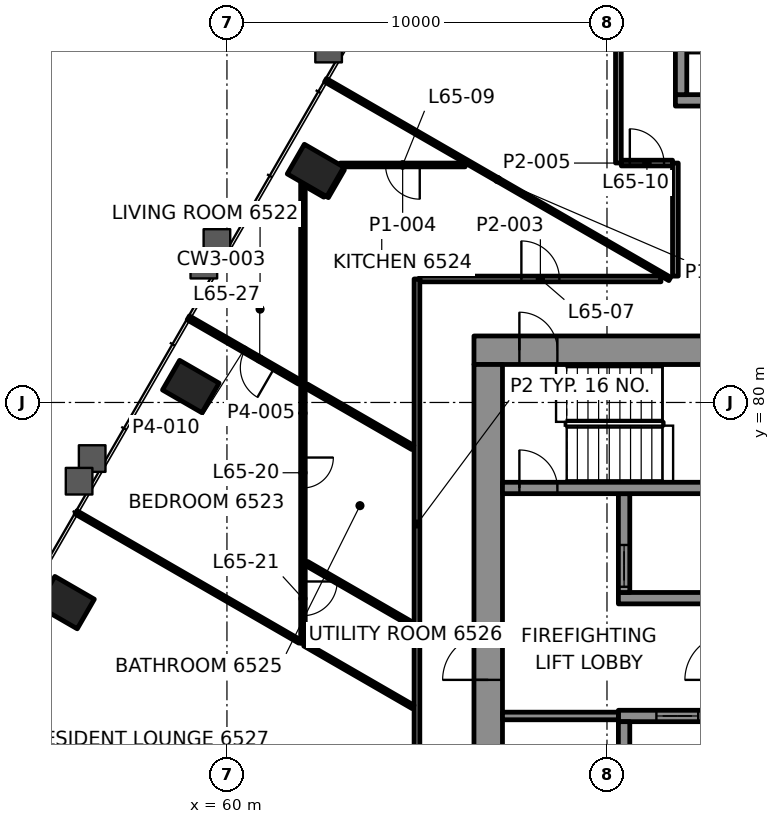
"""IFC4 building model, lengths in metres.
Left out: names, types, materials, properties, quantities, classifications, styles, units other than length and angle.
Written with IfcOpenShell. Run it as: python <this file> out.ifc"""

import sys

from ifc_helpers import new_model, si_unit, direction, frame, frame_2d, origin, origin_2d, place, context, subcontext, project, spatial, rectangle, hollow_rectangle, extrude, element, fill, save


model = new_model("IFC4")
c1 = context("Model", 3, precision=1e-05, world=origin(), true_north=direction((0.0, 1.0)))
c2 = subcontext(c1, "Body", "Model", "MODEL_VIEW")
j1 = project(units=[si_unit("LENGTHUNIT", "METRE"), si_unit("PLANEANGLEUNIT", "RADIAN")], contexts=[c1])
p1 = place(None, origin())
s1 = spatial("IfcSite", under=j1, at=p1, CompositionType="ELEMENT")
p2 = place(p1, origin())
s2 = spatial("IfcBuilding", under=s1, at=p2, CompositionType="ELEMENT")
p3 = place(p2, frame((0.0, 0.0, 274.1)))
s3 = spatial("IfcBuildingStorey", under=s2, at=p3, CompositionType="ELEMENT", Elevation=274.1)
for number, where, z_axis, x_axis in (
    (1, (62.332, 86.105, -0.0), (0.0, 0.0, 1.0), (-0.5, -0.866, 0.0)),
    (2, (59.049, 80.419, -0.0), (0.0, 0.0, 1.0), (-0.5, -0.866, 0.0)),
    (3, (55.766, 74.733, -0.0), (0.0, 0.0, 1.0), (-0.5, -0.866, 0.0)),
):
    element("IfcColumn", number, at=place(p3, frame(where, z_axis=z_axis, x_axis=x_axis)), inside=s3, PredefinedType="COLUMN", context=c2, shape_type="SweptSolid", body=[
        extrude(hollow_rectangle(XDim=0.9, YDim=1.2, WallThickness=0.06, at=origin_2d()), origin(), (0.0, 0.0, 1.0), 3.5),
    ])
p4 = place(p3, frame((66.5, 81.375, 0.0), z_axis=(0.0, 0.0, 1.0), x_axis=(1.0, 0.0, 0.0)))
e4 = element("IfcWall", 4, at=p4, inside=s3, PredefinedType="SHEAR", context=c2, shape_type="SweptSolid", body=[
    extrude(rectangle(XDim=17.0, YDim=0.75, at=frame_2d((8.5, 0.0))), origin(), (0.0, 0.0, 1.0), 3.3),
])
p5 = place(p4, frame((1.195, 0.0, 0.0)))
e5 = element("IfcOpeningElement", 5, at=p5, cuts=e4, PredefinedType="OPENING", context=c2, shape_type="SweptSolid", body=[
    extrude(rectangle(XDim=1.0, YDim=2.1, at=frame_2d((0.5, 1.05))), frame((0.0, 0.385, 0.0), z_axis=(0.0, -1.0, 0.0), x_axis=(1.0, 0.0, 0.0)), (0.0, 0.0, 1.0), 0.77),
])
p6 = place(p4, frame((15.005, 0.0, 0.0)))
e6 = element("IfcOpeningElement", 6, at=p6, cuts=e4, PredefinedType="OPENING", context=c2, shape_type="SweptSolid", body=[
    extrude(rectangle(XDim=1.0, YDim=2.1, at=frame_2d((0.5, 1.05))), frame((0.0, 0.385, 0.0), z_axis=(0.0, -1.0, 0.0), x_axis=(1.0, 0.0, 0.0)), (0.0, 0.0, 1.0), 0.77),
])
p7 = place(p4, frame((8.15, 0.0, 0.0)))
e7 = element("IfcOpeningElement", 7, at=p7, cuts=e4, PredefinedType="OPENING", context=c2, shape_type="SweptSolid", body=[
    extrude(rectangle(XDim=0.9, YDim=2.1, at=frame_2d((0.45, 1.05))), frame((0.0, 0.385, 0.0), z_axis=(0.0, -1.0, 0.0), x_axis=(1.0, 0.0, 0.0)), (0.0, 0.0, 1.0), 0.77),
])
p8 = place(p3, frame((66.875, 69.0, 0.0), z_axis=(0.0, 0.0, 1.0), x_axis=(0.0, 1.0, 0.0)))
e8 = element("IfcWall", 8, at=p8, inside=s3, PredefinedType="SHEAR", context=c2, shape_type="SweptSolid", body=[
    extrude(rectangle(XDim=12.0, YDim=0.75, at=frame_2d((6.0, 0.0))), origin(), (0.0, 0.0, 1.0), 3.3),
])
p9 = place(p8, frame((3.7, 0.0, 0.0)))
e9 = element("IfcOpeningElement", 9, at=p9, cuts=e8, PredefinedType="OPENING", context=c2, shape_type="SweptSolid", body=[
    extrude(rectangle(XDim=1.2, YDim=2.1, at=frame_2d((0.6, 1.05))), frame((0.0, 0.385, 0.0), z_axis=(0.0, -1.0, 0.0), x_axis=(1.0, 0.0, 0.0)), (0.0, 0.0, 1.0), 0.77),
])
p10 = place(p3, frame((70.3, 71.75, 0.0), z_axis=(0.0, 0.0, 1.0), x_axis=(1.0, 0.0, 0.0)))
e10 = element("IfcWall", 10, at=p10, inside=s3, PredefinedType="SHEAR", context=c2, shape_type="SweptSolid", body=[
    extrude(rectangle(XDim=11.5, YDim=0.3, at=frame_2d((5.75, 0.0))), origin(), (0.0, 0.0, 1.0), 3.3),
])
p11 = place(p10, frame((1.0, 0.0, 0.0)))
e11 = element("IfcOpeningElement", 11, at=p11, cuts=e10, PredefinedType="OPENING", context=c2, shape_type="SweptSolid", body=[
    extrude(rectangle(XDim=1.1, YDim=2.1, at=frame_2d((0.55, 1.05))), frame((0.0, 0.16, 0.0), z_axis=(0.0, -1.0, 0.0), x_axis=(1.0, 0.0, 0.0)), (0.0, 0.0, 1.0), 0.32),
])
p12 = place(p10, frame((3.8, 0.0, 0.0)))
e12 = element("IfcOpeningElement", 12, at=p12, cuts=e10, PredefinedType="OPENING", context=c2, shape_type="SweptSolid", body=[
    extrude(rectangle(XDim=1.1, YDim=2.1, at=frame_2d((0.55, 1.05))), frame((0.0, 0.16, 0.0), z_axis=(0.0, -1.0, 0.0), x_axis=(1.0, 0.0, 0.0)), (0.0, 0.0, 1.0), 0.32),
])
p13 = place(p10, frame((6.6, 0.0, 0.0)))
e13 = element("IfcOpeningElement", 13, at=p13, cuts=e10, PredefinedType="OPENING", context=c2, shape_type="SweptSolid", body=[
    extrude(rectangle(XDim=1.1, YDim=2.1, at=frame_2d((0.55, 1.05))), frame((0.0, 0.16, 0.0), z_axis=(0.0, -1.0, 0.0), x_axis=(1.0, 0.0, 0.0)), (0.0, 0.0, 1.0), 0.32),
])
p14 = place(p10, frame((9.4, 0.0, 0.0)))
e14 = element("IfcOpeningElement", 14, at=p14, cuts=e10, PredefinedType="OPENING", context=c2, shape_type="SweptSolid", body=[
    extrude(rectangle(XDim=1.1, YDim=2.1, at=frame_2d((0.55, 1.05))), frame((0.0, 0.16, 0.0), z_axis=(0.0, -1.0, 0.0), x_axis=(1.0, 0.0, 0.0)), (0.0, 0.0, 1.0), 0.32),
])
p15 = place(p3, frame((70.3, 74.85, 0.0), z_axis=(0.0, 0.0, 1.0), x_axis=(1.0, 0.0, 0.0)))
e15 = element("IfcWall", 15, at=p15, inside=s3, PredefinedType="SHEAR", context=c2, shape_type="SweptSolid", body=[
    extrude(rectangle(XDim=5.9, YDim=0.3, at=frame_2d((2.95, 0.0))), origin(), (0.0, 0.0, 1.0), 3.3),
])
p16 = place(p15, frame((3.8, 0.0, 0.0)))
e16 = element("IfcOpeningElement", 16, at=p16, cuts=e15, PredefinedType="OPENING", context=c2, shape_type="SweptSolid", body=[
    extrude(rectangle(XDim=1.1, YDim=2.1, at=frame_2d((0.55, 1.05))), frame((0.0, 0.16, 0.0), z_axis=(0.0, -1.0, 0.0), x_axis=(1.0, 0.0, 0.0)), (0.0, 0.0, 1.0), 0.32),
])
p17 = place(p3, frame((70.45, 69.0, 0.0), z_axis=(0.0, 0.0, 1.0), x_axis=(0.0, 1.0, 0.0)))
e17 = element("IfcWall", 17, at=p17, inside=s3, PredefinedType="SHEAR", context=c2, shape_type="SweptSolid", body=[
    extrude(rectangle(XDim=2.6, YDim=0.3, at=frame_2d((1.3, 0.0))), origin(), (0.0, 0.0, 1.0), 3.3),
])
p18 = place(p3, frame((70.45, 75.0, 0.0), z_axis=(0.0, 0.0, 1.0), x_axis=(0.0, 1.0, 0.0)))
e18 = element("IfcWall", 18, at=p18, inside=s3, PredefinedType="SHEAR", context=c2, shape_type="SweptSolid", body=[
    extrude(rectangle(XDim=2.6, YDim=0.3, at=frame_2d((1.3, 0.0))), origin(), (0.0, 0.0, 1.0), 3.3),
])
p19 = place(p18, frame((0.15, 0.0, 0.0)))
e19 = element("IfcOpeningElement", 19, at=p19, cuts=e18, PredefinedType="OPENING", context=c2, shape_type="SweptSolid", body=[
    extrude(rectangle(XDim=1.1, YDim=2.1, at=frame_2d((0.55, 1.05))), frame((0.0, 0.16, 0.0), z_axis=(0.0, -1.0, 0.0), x_axis=(1.0, 0.0, 0.0)), (0.0, 0.0, 1.0), 0.32),
])
p20 = place(p3, frame((67.25, 77.75, 0.0), z_axis=(0.0, 0.0, 1.0), x_axis=(1.0, 0.0, 0.0)))
e20 = element("IfcWall", 20, at=p20, inside=s3, PredefinedType="SHEAR", context=c2, shape_type="SweptSolid", body=[
    extrude(rectangle(XDim=15.5, YDim=0.3, at=frame_2d((7.75, 0.0))), origin(), (0.0, 0.0, 1.0), 3.3),
])
p21 = place(p20, frame((0.445, 0.0, 0.0)))
e21 = element("IfcOpeningElement", 21, at=p21, cuts=e20, PredefinedType="OPENING", context=c2, shape_type="SweptSolid", body=[
    extrude(rectangle(XDim=1.0, YDim=2.1, at=frame_2d((0.5, 1.05))), frame((0.0, 0.16, 0.0), z_axis=(0.0, -1.0, 0.0), x_axis=(1.0, 0.0, 0.0)), (0.0, 0.0, 1.0), 0.32),
])
p22 = place(p3, frame((71.8, 87.95, 0.0), z_axis=(0.0, 0.0, 1.0), x_axis=(1.0, 0.0, 0.0)))
e22 = element("IfcWall", 22, at=p22, inside=s3, PredefinedType="SHEAR", context=c2, shape_type="SweptSolid", body=[
    extrude(rectangle(XDim=6.4, YDim=0.3, at=frame_2d((3.2, 0.0))), origin(), (0.0, 0.0, 1.0), 3.3),
])
p23 = place(p22, frame((1.325, 0.0, 0.0)))
e23 = element("IfcOpeningElement", 23, at=p23, cuts=e22, PredefinedType="OPENING", context=c2, shape_type="SweptSolid", body=[
    extrude(rectangle(XDim=1.0, YDim=2.1, at=frame_2d((0.5, 1.05))), frame((0.0, 0.16, 0.0), z_axis=(0.0, -1.0, 0.0), x_axis=(1.0, 0.0, 0.0)), (0.0, 0.0, 1.0), 0.32),
])
p24 = place(p22, frame((4.125, 0.0, 0.0)))
e24 = element("IfcOpeningElement", 24, at=p24, cuts=e22, PredefinedType="OPENING", context=c2, shape_type="SweptSolid", body=[
    extrude(rectangle(XDim=1.2, YDim=2.1, at=frame_2d((0.6, 1.05))), frame((0.0, 0.16, 0.0), z_axis=(0.0, -1.0, 0.0), x_axis=(1.0, 0.0, 0.0)), (0.0, 0.0, 1.0), 0.32),
])
p25 = place(p3, frame((71.95, 88.1, 0.0), z_axis=(0.0, 0.0, 1.0), x_axis=(0.0, 1.0, 0.0)))
e25 = element("IfcWall", 25, at=p25, inside=s3, PredefinedType="SHEAR", context=c2, shape_type="SweptSolid", body=[
    extrude(rectangle(XDim=6.2, YDim=0.3, at=frame_2d((3.1, 0.0))), origin(), (0.0, 0.0, 1.0), 3.3),
])
p26 = place(p3, frame((65.075, 83.25, 0.0), z_axis=(0.0, 0.0, 1.0), x_axis=(1.0, 0.0, 0.0)))
e26 = element("IfcWall", 26, at=p26, inside=s3, PredefinedType="PARTITIONING", context=c2, shape_type="SweptSolid", body=[
    extrude(rectangle(XDim=6.345, YDim=0.15, at=frame_2d((3.172, 0.0))), origin(), (0.0, 0.0, 1.0), 2.7),
])
p27 = place(p26, frame((2.672, 0.0, 0.0)))
e27 = element("IfcOpeningElement", 27, at=p27, cuts=e26, PredefinedType="OPENING", context=c2, shape_type="SweptSolid", body=[
    extrude(rectangle(XDim=1.0, YDim=2.1, at=frame_2d((0.5, 1.05))), frame((0.0, 0.085, 0.0), z_axis=(0.0, -1.0, 0.0), x_axis=(1.0, 0.0, 0.0)), (0.0, 0.0, 1.0), 0.17),
])
p28 = place(p3, frame((66.267, 86.25, 0.0), z_axis=(0.0, 0.0, 1.0), x_axis=(-1.0, 0.0, 0.0)))
e28 = element("IfcWall", 28, at=p28, inside=s3, PredefinedType="PARTITIONING", context=c2, shape_type="SweptSolid", body=[
    extrude(rectangle(XDim=3.287, YDim=0.1, at=frame_2d((1.644, 0.0))), origin(), (0.0, 0.0, 1.0), 2.7),
])
p29 = place(p28, frame((1.193, 0.0, 0.0)))
e29 = element("IfcOpeningElement", 29, at=p29, cuts=e28, PredefinedType="OPENING", context=c2, shape_type="SweptSolid", body=[
    extrude(rectangle(XDim=0.9, YDim=2.1, at=frame_2d((0.45, 1.05))), frame((0.0, 0.06, 0.0), z_axis=(0.0, -1.0, 0.0), x_axis=(1.0, 0.0, 0.0)), (0.0, 0.0, 1.0), 0.12),
])
p30 = place(p3, frame((70.377, 86.3, 0.0), z_axis=(0.0, 0.0, 1.0), x_axis=(1.0, 0.0, 0.0)))
e30 = element("IfcWall", 30, at=p30, inside=s3, PredefinedType="PARTITIONING", context=c2, shape_type="SweptSolid", body=[
    extrude(rectangle(XDim=1.348, YDim=0.15, at=frame_2d((0.674, 0.0))), origin(), (0.0, 0.0, 1.0), 2.7),
])
p31 = place(p30, frame((0.224, 0.0, 0.0)))
e31 = element("IfcOpeningElement", 31, at=p31, cuts=e30, PredefinedType="OPENING", context=c2, shape_type="SweptSolid", body=[
    extrude(rectangle(XDim=0.9, YDim=2.1, at=frame_2d((0.45, 1.05))), frame((0.0, 0.085, 0.0), z_axis=(0.0, -1.0, 0.0), x_axis=(1.0, 0.0, 0.0)), (0.0, 0.0, 1.0), 0.17),
])
p32 = place(p3, frame((62.626, 85.415, 0.0), z_axis=(0.0, 0.0, 1.0), x_axis=(0.499973348067, 0.866040790738, 0.0)))
e32 = element("IfcWall", 32, at=p32, inside=s3, PredefinedType="PARTITIONING", context=c2, shape_type="SweptSolid", body=[
    extrude(rectangle(XDim=0.842, YDim=0.1, at=frame_2d((0.421, 0.0))), origin(), (0.0, 0.0, 1.0), 2.7),
])
p33 = place(p3, frame((71.8, 83.325, 0.0), z_axis=(0.0, 0.0, 1.0), x_axis=(0.0, 1.0, 0.0)))
e33 = element("IfcWall", 33, at=p33, inside=s3, PredefinedType="PARTITIONING", context=c2, shape_type="SweptSolid", body=[
    extrude(rectangle(XDim=2.975, YDim=0.15, at=frame_2d((1.488, 0.0))), origin(), (0.0, 0.0, 1.0), 2.697),
])
p34 = place(p3, frame((70.3, 86.302, 0.0), z_axis=(0.0, 0.0, 1.0), x_axis=(0.0, 1.0, 0.0)))
e34 = element("IfcWall", 34, at=p34, inside=s3, PredefinedType="PARTITIONING", context=c2, shape_type="SweptSolid", body=[
    extrude(rectangle(XDim=9.796, YDim=0.15, at=frame_2d((4.898, 0.0))), origin(), (0.0, 0.0, 1.0), 2.7),
])
p35 = place(p3, frame((65.0, 70.352, 0.0), z_axis=(0.0, 0.0, 1.0), x_axis=(0.0, 1.0, 0.0)))
e35 = element("IfcWall", 35, at=p35, inside=s3, PredefinedType="PARTITIONING", context=c2, shape_type="SweptSolid", body=[
    extrude(rectangle(XDim=12.898, YDim=0.15, at=frame_2d((6.449, 0.0))), origin(), (0.0, 0.0, 1.0), 2.7),
])
p36 = place(p3, frame((62.0, 85.776, 0.0), z_axis=(0.0, 0.0, 1.0), x_axis=(0.0, -1.0, 0.0)))
e36 = element("IfcWall", 36, at=p36, inside=s3, PredefinedType="PARTITIONING", context=c2, shape_type="SweptSolid", body=[
    extrude(rectangle(XDim=12.115, YDim=0.12, at=frame_2d((6.058, 0.0))), origin(), (0.0, 0.0, 1.0), 2.688),
])
p37 = place(p36, frame((7.226, 0.0, 0.0)))
e37 = element("IfcOpeningElement", 37, at=p37, cuts=e36, PredefinedType="OPENING", context=c2, shape_type="SweptSolid", body=[
    extrude(rectangle(XDim=0.8, YDim=2.1, at=frame_2d((0.4, 1.05))), frame((0.0, 0.07, 0.0), z_axis=(0.0, -1.0, 0.0), x_axis=(1.0, 0.0, 0.0)), (0.0, 0.0, 1.0), 0.14),
])
p38 = place(p36, frame((10.487, 0.0, 0.0)))
e38 = element("IfcOpeningElement", 38, at=p38, cuts=e36, PredefinedType="OPENING", context=c2, shape_type="SweptSolid", body=[
    extrude(rectangle(XDim=0.9, YDim=2.1, at=frame_2d((0.45, 1.05))), frame((0.0, 0.07, 0.0), z_axis=(0.0, -1.0, 0.0), x_axis=(1.0, 0.0, 0.0)), (0.0, 0.0, 1.0), 0.14),
])
p39 = place(p3, frame((71.653, 83.25, 0.0), z_axis=(0.0, 0.0, 1.0), x_axis=(-0.866025448133, 0.499999923186, 0.0)))
e39 = element("IfcWall", 39, at=p39, inside=s3, PredefinedType="PARTITIONING", context=c2, shape_type="SweptSolid", body=[
    extrude(rectangle(XDim=10.46, YDim=0.1, at=frame_2d((5.23, 0.0))), origin(), (0.0, 0.0, 1.0), 2.688),
])
p40 = place(p3, frame((62.574, 85.445, 0.0), z_axis=(0.0, 0.0, 1.0), x_axis=(-0.866048512801, 0.499959971872, 0.0)))
e40 = element("IfcWall", 40, at=p40, inside=s3, PredefinedType="PARTITIONING", context=c2, shape_type="SweptSolid", body=[
    extrude(rectangle(XDim=0.563, YDim=0.1, at=frame_2d((0.282, 0.0))), origin(), (0.0, 0.0, 1.0), 2.688),
])
p41 = place(p3, frame((64.89, 78.815, 0.0), z_axis=(0.0, 0.0, 1.0), x_axis=(-0.866032190624, 0.499988244665, 0.0)))
e41 = element("IfcWall", 41, at=p41, inside=s3, PredefinedType="PARTITIONING", context=c2, shape_type="SweptSolid", body=[
    extrude(rectangle(XDim=3.233, YDim=0.12, at=frame_2d((1.617, 0.0))), origin(), (0.0, 0.0, 1.0), 2.7),
])
p42 = place(p3, frame((64.891, 74.149, 0.0), z_axis=(0.0, 0.0, 1.0), x_axis=(-0.866019355129, 0.500010476433, 0.0)))
e42 = element("IfcWall", 42, at=p42, inside=s3, PredefinedType="PARTITIONING", context=c2, shape_type="SweptSolid", body=[
    extrude(rectangle(XDim=3.229, YDim=0.12, at=frame_2d((1.614, 0.0))), origin(), (0.0, 0.0, 1.0), 2.7),
])
p43 = place(p3, frame((64.899, 71.987, 0.0), z_axis=(0.0, 0.0, 1.0), x_axis=(-0.866032610133, 0.499987518031, 0.0)))
e43 = element("IfcWall", 43, at=p43, inside=s3, PredefinedType="PARTITIONING", context=c2, shape_type="SweptSolid", body=[
    extrude(rectangle(XDim=3.295, YDim=0.1, at=frame_2d((1.648, 0.0))), origin(), (0.0, 0.0, 1.0), 2.7),
])
p44 = place(p3, frame((61.91, 80.536, 0.0), z_axis=(0.0, 0.0, 1.0), x_axis=(-0.866002725405, 0.500039278049, 0.0)))
e44 = element("IfcWall", 44, at=p44, inside=s3, PredefinedType="PARTITIONING", context=c2, shape_type="SweptSolid", body=[
    extrude(rectangle(XDim=3.38, YDim=0.12, at=frame_2d((1.69, 0.0))), origin(), (0.0, 0.0, 1.0), 2.688),
])
p45 = place(p44, frame((0.76, 0.0, 0.0)))
e45 = element("IfcOpeningElement", 45, at=p45, cuts=e44, PredefinedType="OPENING", context=c2, shape_type="SweptSolid", body=[
    extrude(rectangle(XDim=0.9, YDim=2.1, at=frame_2d((0.45, 1.05))), frame((0.0, 0.07, 0.0), z_axis=(0.0, -1.0, 0.0), x_axis=(1.0, 0.0, 0.0)), (0.0, 0.0, 1.0), 0.14),
])
p46 = place(p3, frame((61.915, 73.71, 0.0), z_axis=(0.0, 0.0, 1.0), x_axis=(-0.866024081565, 0.500002290144, 0.0)))
e46 = element("IfcWall", 46, at=p46, inside=s3, PredefinedType="PARTITIONING", context=c2, shape_type="SweptSolid", body=[
    extrude(rectangle(XDim=6.797, YDim=0.1, at=frame_2d((3.398, 0.0))), origin(), (0.0, 0.0, 1.0), 2.688),
])
p47 = place(p3, frame((67.25, 71.75, 0.0), z_axis=(0.0, 0.0, 1.0), x_axis=(1.0, 0.0, 0.0)))
e47 = element("IfcWall", 47, at=p47, inside=s3, PredefinedType="PARTITIONING", context=c2, shape_type="SweptSolid", body=[
    extrude(rectangle(XDim=3.05, YDim=0.2, at=frame_2d((1.525, 0.0))), origin(), (0.0, 0.0, 1.0), 3.3),
])
p48 = place(p27, origin())
e48 = element("IfcDoor", 48, at=p48, inside=s3, OperationType="SINGLE_SWING_RIGHT", PredefinedType="DOOR", context=c2, shape_type="SweptSolid", body=[
    extrude(rectangle(XDim=1.0, YDim=2.1, at=frame_2d((0.5, 1.05))), frame((0.0, 0.025, 0.0), z_axis=(0.0, -1.0, 0.0), x_axis=(1.0, 0.0, 0.0)), (0.0, 0.0, 1.0), 0.05),
])
fill(e27, e48)
p49 = place(p29, origin())
e49 = element("IfcDoor", 49, at=p49, inside=s3, OperationType="SINGLE_SWING_RIGHT", PredefinedType="DOOR", context=c2, shape_type="SweptSolid", body=[
    extrude(rectangle(XDim=0.9, YDim=2.1, at=frame_2d((0.45, 1.05))), frame((0.0, 0.025, 0.0), z_axis=(0.0, -1.0, 0.0), x_axis=(1.0, 0.0, 0.0)), (0.0, 0.0, 1.0), 0.05),
])
fill(e29, e49)
p50 = place(p31, origin())
e50 = element("IfcDoor", 50, at=p50, inside=s3, OperationType="SINGLE_SWING_RIGHT", PredefinedType="DOOR", context=c2, shape_type="SweptSolid", body=[
    extrude(rectangle(XDim=0.9, YDim=2.1, at=frame_2d((0.45, 1.05))), frame((0.0, 0.025, 0.0), z_axis=(0.0, -1.0, 0.0), x_axis=(1.0, 0.0, 0.0)), (0.0, 0.0, 1.0), 0.05),
])
fill(e31, e50)
p51 = place(p37, origin())
e51 = element("IfcDoor", 51, at=p51, inside=s3, OperationType="SINGLE_SWING_RIGHT", PredefinedType="DOOR", context=c2, shape_type="SweptSolid", body=[
    extrude(rectangle(XDim=0.8, YDim=2.1, at=frame_2d((0.4, 1.05))), frame((0.0, 0.025, 0.0), z_axis=(0.0, -1.0, 0.0), x_axis=(1.0, 0.0, 0.0)), (0.0, 0.0, 1.0), 0.05),
])
fill(e37, e51)
p52 = place(p38, origin())
e52 = element("IfcDoor", 52, at=p52, inside=s3, OperationType="SINGLE_SWING_LEFT", PredefinedType="DOOR", context=c2, shape_type="SweptSolid", body=[
    extrude(rectangle(XDim=0.9, YDim=2.1, at=frame_2d((0.45, 1.05))), frame((0.0, 0.025, 0.0), z_axis=(0.0, -1.0, 0.0), x_axis=(1.0, 0.0, 0.0)), (0.0, 0.0, 1.0), 0.05),
])
fill(e38, e52)
p53 = place(p45, origin())
e53 = element("IfcDoor", 53, at=p53, inside=s3, OperationType="SINGLE_SWING_LEFT", PredefinedType="DOOR", context=c2, shape_type="SweptSolid", body=[
    extrude(rectangle(XDim=0.9, YDim=2.1, at=frame_2d((0.45, 1.05))), frame((0.0, 0.025, 0.0), z_axis=(0.0, -1.0, 0.0), x_axis=(1.0, 0.0, 0.0)), (0.0, 0.0, 1.0), 0.05),
])
fill(e45, e53)
p54 = place(p11, origin())
e54 = element("IfcDoor", 54, at=p54, inside=s3, OperationType="DOUBLE_DOOR_SLIDING", PredefinedType="DOOR", context=c2, shape_type="SweptSolid", body=[
    extrude(rectangle(XDim=1.1, YDim=2.1, at=frame_2d((0.55, 1.05))), frame((0.0, 0.025, 0.0), z_axis=(0.0, -1.0, 0.0), x_axis=(1.0, 0.0, 0.0)), (0.0, 0.0, 1.0), 0.05),
])
fill(e11, e54)
p55 = place(p19, origin())
e55 = element("IfcDoor", 55, at=p55, inside=s3, OperationType="DOUBLE_DOOR_SLIDING", PredefinedType="DOOR", context=c2, shape_type="SweptSolid", body=[
    extrude(rectangle(XDim=1.1, YDim=2.1, at=frame_2d((0.55, 1.05))), frame((0.0, 0.025, 0.0), z_axis=(0.0, -1.0, 0.0), x_axis=(1.0, 0.0, 0.0)), (0.0, 0.0, 1.0), 0.05),
])
fill(e19, e55)
p56 = place(p21, origin())
e56 = element("IfcDoor", 56, at=p56, inside=s3, OperationType="SINGLE_SWING_LEFT", PredefinedType="DOOR", context=c2, shape_type="SweptSolid", body=[
    extrude(rectangle(XDim=1.0, YDim=2.1, at=frame_2d((0.5, 1.05))), frame((0.0, 0.025, 0.0), z_axis=(0.0, -1.0, 0.0), x_axis=(1.0, 0.0, 0.0)), (0.0, 0.0, 1.0), 0.05),
])
fill(e21, e56)
p57 = place(p5, origin())
e57 = element("IfcDoor", 57, at=p57, inside=s3, OperationType="SINGLE_SWING_RIGHT", PredefinedType="DOOR", context=c2, shape_type="SweptSolid", body=[
    extrude(rectangle(XDim=1.0, YDim=2.1, at=frame_2d((0.5, 1.05))), frame((0.0, 0.095, 0.0), z_axis=(0.0, -1.0, 0.0), x_axis=(1.0, 0.0, 0.0)), (0.0, 0.0, 1.0), 0.19),
])
fill(e5, e57)
p58 = place(p9, origin())
e58 = element("IfcDoor", 58, at=p58, inside=s3, OperationType="SINGLE_SWING_RIGHT", PredefinedType="DOOR", context=c2, shape_type="SweptSolid", body=[
    extrude(rectangle(XDim=1.2, YDim=2.1, at=frame_2d((0.6, 1.05))), frame((0.0, 0.095, 0.0), z_axis=(0.0, -1.0, 0.0), x_axis=(1.0, 0.0, 0.0)), (0.0, 0.0, 1.0), 0.19),
])
fill(e9, e58)
save(model, sys.argv[1])
